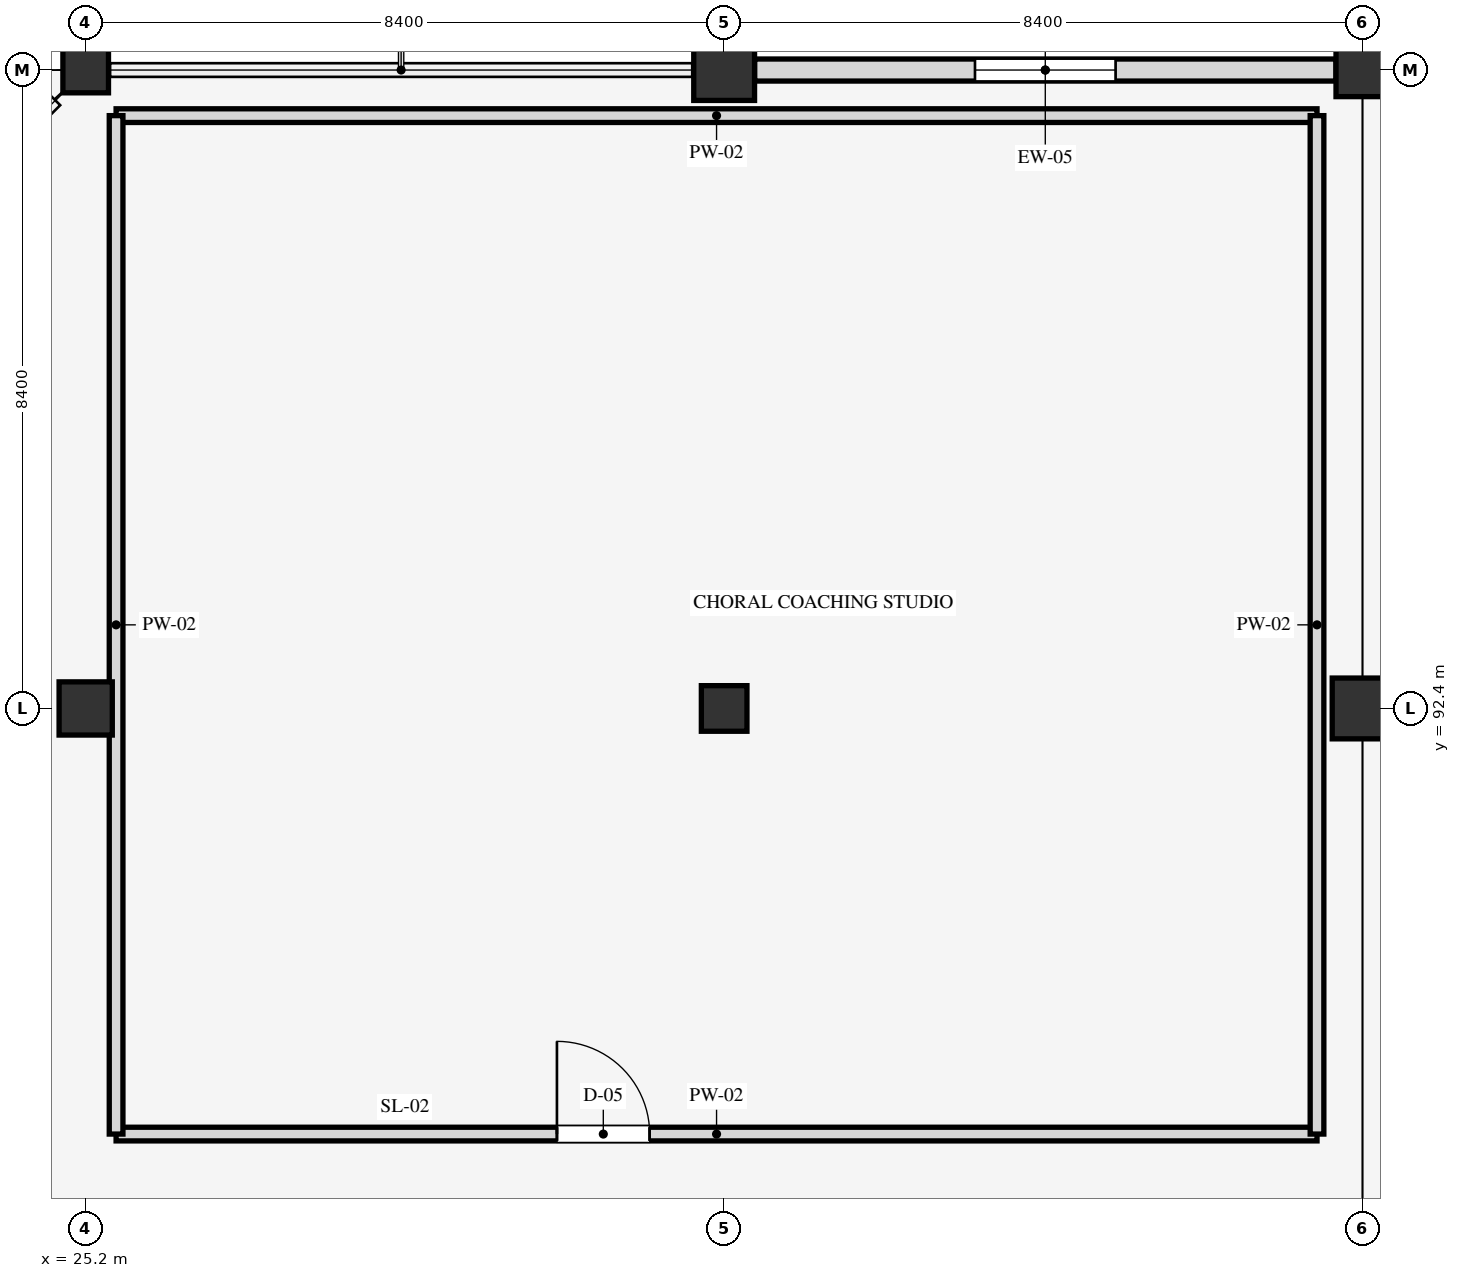
"""IFC4 building model, lengths in metres.
Left out: names, types, materials, properties, quantities, classifications, styles, units other than length and angle.
Written with IfcOpenShell. Run it as: python <this file> out.ifc"""

import sys

from ifc_helpers import new_model, si_unit, direction, frame, frame_2d, origin, origin_2d, place, context, subcontext, project, spatial, rectangle, extrude, element, fill, save


model = new_model("IFC4")
c1 = context("Model", 3, precision=1e-05, world=origin(), true_north=direction((0.0, 1.0)))
c2 = subcontext(c1, "Body", "Model", "MODEL_VIEW")
j1 = project(units=[si_unit("LENGTHUNIT", "METRE"), si_unit("PLANEANGLEUNIT", "RADIAN")], contexts=[c1])
p1 = place(None, origin())
s1 = spatial("IfcSite", under=j1, at=p1, CompositionType="ELEMENT")
p2 = place(p1, origin())
s2 = spatial("IfcBuilding", under=s1, at=p2, CompositionType="ELEMENT")
p3 = place(p2, frame((0.0, 0.0, 18.9)))
s3 = spatial("IfcBuildingStorey", under=s2, at=p3, CompositionType="ELEMENT", Elevation=18.9)
p4 = place(p3, frame((25.2, 92.4, 0.0), z_axis=(0.0, 0.0, 1.0), x_axis=(1.0, 0.0, 0.0)))
e1 = element("IfcColumn", 1, at=p4, inside=s3, PredefinedType="COLUMN", context=c2, shape_type="SweptSolid", body=[
    extrude(rectangle(XDim=0.7, YDim=0.7, at=origin_2d()), origin(), (0.0, 0.0, 1.0), 4.5),
])
for number, where, z_axis, x_axis in (
    (2, (25.2, 100.8, 0.0), (0.0, 0.0, 1.0), (1.0, 0.0, 0.0)),
    (3, (33.6, 92.4, 0.0), (0.0, 0.0, 1.0), (1.0, 0.0, 0.0)),
):
    element("IfcColumn", number, at=place(p3, frame(where, z_axis=z_axis, x_axis=x_axis)), inside=s3, PredefinedType="COLUMN", context=c2, shape_type="SweptSolid", body=[
        extrude(rectangle(XDim=0.6, YDim=0.6, at=origin_2d()), origin(), (0.0, 0.0, 1.0), 4.5),
    ])
for number, where, z_axis, x_axis in (
    (4, (33.6, 100.8, 0.0), (0.0, 0.0, 1.0), (1.0, 0.0, 0.0)),
    (5, (42.0, 92.4, 0.0), (0.0, 0.0, 1.0), (1.0, 0.0, 0.0)),
):
    element("IfcColumn", number, at=place(p3, frame(where, z_axis=z_axis, x_axis=x_axis)), inside=s3, PredefinedType="COLUMN", context=c2, shape_type="SweptSolid", body=[
        extrude(rectangle(XDim=0.8, YDim=0.8, at=origin_2d()), origin(), (0.0, 0.0, 1.0), 4.5),
    ])
p5 = place(p3, frame((42.0, 100.8, 0.0), z_axis=(0.0, 0.0, 1.0), x_axis=(1.0, 0.0, 0.0)))
e6 = element("IfcColumn", 6, at=p5, inside=s3, PredefinedType="COLUMN", context=c2, shape_type="SweptSolid", body=[
    extrude(rectangle(XDim=0.7, YDim=0.7, at=origin_2d()), origin(), (0.0, 0.0, 1.0), 4.5),
])
p6 = place(p3, frame((41.65, 100.8, 0.0), z_axis=(0.0, 0.0, 1.0), x_axis=(-1.0, 0.0, 0.0)))
e7 = element("IfcWall", 7, at=p6, inside=s3, PredefinedType="STANDARD", context=c2, shape_type="SweptSolid", body=[
    extrude(rectangle(XDim=7.65, YDim=0.29, at=frame_2d((3.825, 0.0))), origin(), (0.0, 0.0, 1.0), 3.68),
])
p7 = place(p6, frame((2.9, 0.0, 0.85)))
e8 = element("IfcOpeningElement", 8, at=p7, cuts=e7, PredefinedType="OPENING", context=c2, shape_type="SweptSolid", body=[
    extrude(rectangle(XDim=1.85, YDim=2.05, at=frame_2d((0.925, 1.025))), frame((0.0, 0.155, 0.0), z_axis=(0.0, -1.0, 0.0), x_axis=(1.0, 0.0, 0.0)), (0.0, 0.0, 1.0), 0.31),
])
p8 = place(p3, frame((25.6, 86.8, 0.0), z_axis=(0.0, 0.0, 1.0), x_axis=(1.0, 0.0, 0.0)))
e9 = element("IfcWall", 9, at=p8, inside=s3, PredefinedType="PARTITIONING", context=c2, shape_type="SweptSolid", body=[
    extrude(rectangle(XDim=15.8, YDim=0.18, at=frame_2d((7.9, 0.0))), origin(), (0.0, 0.0, 1.0), 3.54),
])
p9 = place(p8, frame((5.8, 0.0, 0.0)))
e10 = element("IfcOpeningElement", 10, at=p9, cuts=e9, PredefinedType="OPENING", context=c2, shape_type="SweptSolid", body=[
    extrude(rectangle(XDim=1.22, YDim=2.15, at=frame_2d((0.61, 1.075))), frame((0.0, 0.1, 0.0), z_axis=(0.0, -1.0, 0.0), x_axis=(1.0, 0.0, 0.0)), (0.0, 0.0, 1.0), 0.2),
])
p10 = place(p3, frame((25.6, 100.2, 0.0), z_axis=(0.0, 0.0, 1.0), x_axis=(1.0, 0.0, 0.0)))
e11 = element("IfcWall", 11, at=p10, inside=s3, PredefinedType="PARTITIONING", context=c2, shape_type="SweptSolid", body=[
    extrude(rectangle(XDim=15.8, YDim=0.18, at=frame_2d((7.9, 0.0))), origin(), (0.0, 0.0, 1.0), 3.54),
])
for number, where, z_axis, x_axis in (
    (12, (25.6, 86.8, 0.0), (0.0, 0.0, 1.0), (0.0, 1.0, 0.0)),
    (13, (41.4, 86.8, 0.0), (0.0, 0.0, 1.0), (0.0, 1.0, 0.0)),
):
    element("IfcWall", number, at=place(p3, frame(where, z_axis=z_axis, x_axis=x_axis)), inside=s3, PredefinedType="PARTITIONING", context=c2, shape_type="SweptSolid", body=[
        extrude(rectangle(XDim=13.4, YDim=0.18, at=frame_2d((6.7, 0.0))), origin(), (0.0, 0.0, 1.0), 3.54),
    ])
p11 = place(p7, origin())
e14 = element("IfcWindow", 14, at=p11, inside=s3, PartitioningType="DOUBLE_PANEL_VERTICAL", PredefinedType="WINDOW", context=c2, shape_type="SweptSolid", body=[
    extrude(rectangle(XDim=1.85, YDim=2.05, at=frame_2d((0.925, 1.025))), frame((0.0, 0.03, 0.0), z_axis=(0.0, -1.0, 0.0), x_axis=(1.0, 0.0, 0.0)), (0.0, 0.0, 1.0), 0.06),
])
fill(e8, e14)
p12 = place(p9, origin())
e15 = element("IfcDoor", 15, at=p12, inside=s3, OperationType="SINGLE_SWING_LEFT", PredefinedType="DOOR", context=c2, shape_type="SweptSolid", body=[
    extrude(rectangle(XDim=1.22, YDim=2.15, at=frame_2d((0.61, 1.075))), frame((0.0, 0.025, 0.0), z_axis=(0.0, -1.0, 0.0), x_axis=(1.0, 0.0, 0.0)), (0.0, 0.0, 1.0), 0.05),
])
fill(e10, e15)
save(model, sys.argv[1])
